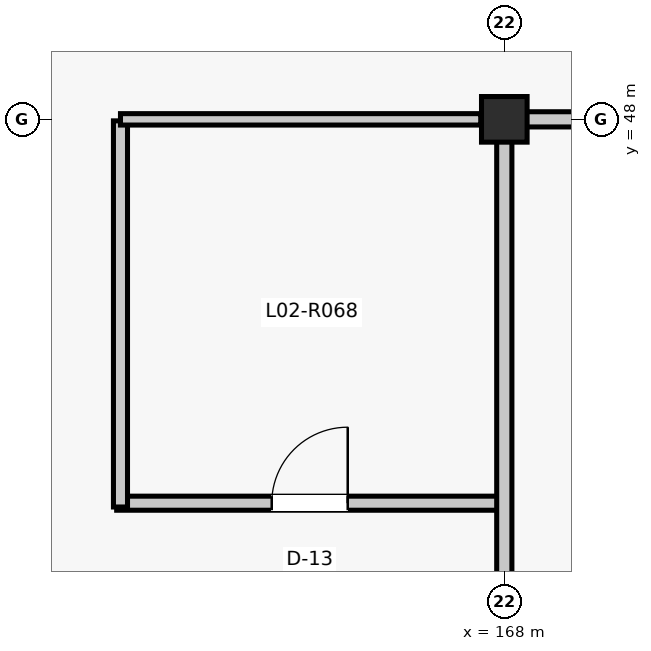
"""IFC4 building model, lengths in metres.
Left out: names, types, materials, properties, quantities, classifications, styles, units other than length and angle.
Written with IfcOpenShell. Run it as: python <this file> out.ifc"""

import sys

from ifc_helpers import new_model, si_unit, direction, frame, frame_2d, origin, origin_2d, place, context, subcontext, project, spatial, rectangle, extrude, element, fill, save


model = new_model("IFC4")
c1 = context("Model", 3, precision=1e-05, world=origin(), true_north=direction((0.0, 1.0)))
c2 = subcontext(c1, "Body", "Model", "MODEL_VIEW")
j1 = project(units=[si_unit("LENGTHUNIT", "METRE"), si_unit("PLANEANGLEUNIT", "RADIAN")], contexts=[c1])
p1 = place(None, origin())
s1 = spatial("IfcSite", under=j1, at=p1, CompositionType="ELEMENT")
p2 = place(p1, origin())
s2 = spatial("IfcBuilding", under=s1, at=p2, CompositionType="ELEMENT")
p3 = place(p2, frame((0.0, 0.0, 9.9)))
s3 = spatial("IfcBuildingStorey", under=s2, at=p3, CompositionType="ELEMENT", Elevation=9.9)
p4 = place(p3, frame((168.0, 48.0, 0.0), z_axis=(0.0, 0.0, 1.0), x_axis=(1.0, 0.0, 0.0)))
e1 = element("IfcColumn", 1, at=p4, inside=s3, PredefinedType="COLUMN", context=c2, shape_type="SweptSolid", body=[
    extrude(rectangle(XDim=0.6, YDim=0.6, at=origin_2d()), origin(), (0.0, 0.0, 1.0), 3.96),
])
p5 = place(p3, frame((162.9, 42.95, 0.0), z_axis=(0.0, 0.0, 1.0), x_axis=(1.0, 0.0, 0.0)))
e2 = element("IfcWall", 2, at=p5, inside=s3, PredefinedType="PARTITIONING", context=c2, shape_type="SweptSolid", body=[
    extrude(rectangle(XDim=5.08, YDim=0.185, at=frame_2d((2.54, 0.0))), origin(), (0.0, 0.0, 1.0), 3.151),
])
p6 = place(p5, frame((2.04, 0.0, 0.0)))
e3 = element("IfcOpeningElement", 3, at=p6, cuts=e2, PredefinedType="OPENING", context=c2, shape_type="SweptSolid", body=[
    extrude(rectangle(XDim=1.0, YDim=2.15, at=frame_2d((0.5, 1.075))), frame((0.0, 0.103, 0.0), z_axis=(0.0, -1.0, 0.0), x_axis=(1.0, 0.0, 0.0)), (0.0, 0.0, 1.0), 0.205),
])
p7 = place(p3, frame((162.95, 42.9, 0.0), z_axis=(0.0, 0.0, 1.0), x_axis=(0.0, 1.0, 0.0)))
e4 = element("IfcWall", 4, at=p7, inside=s3, PredefinedType="PARTITIONING", context=c2, shape_type="SweptSolid", body=[
    extrude(rectangle(XDim=5.08, YDim=0.185, at=frame_2d((2.54, 0.0))), origin(), (0.0, 0.0, 1.0), 3.141),
])
p8 = place(p3, frame((162.95, 48.0, 0.0), z_axis=(0.0, 0.0, 1.0), x_axis=(1.0, 0.0, 0.0)))
e5 = element("IfcWall", 5, at=p8, inside=s3, PredefinedType="PARTITIONING", context=c2, shape_type="SweptSolid", body=[
    extrude(rectangle(XDim=4.74, YDim=0.15, at=frame_2d((2.37, 0.0))), origin(), (0.0, 0.0, 1.0), 3.141),
])
p9 = place(p3, frame((168.0, 40.29, 0.0), z_axis=(0.0, 0.0, 1.0), x_axis=(0.0, 1.0, 0.0)))
e6 = element("IfcWall", 6, at=p9, inside=s3, PredefinedType="PARTITIONING", context=c2, shape_type="SweptSolid", body=[
    extrude(rectangle(XDim=7.42, YDim=0.2, at=frame_2d((3.71, 0.0))), origin(), (0.0, 0.0, 1.0), 3.151),
])
p10 = place(p9, frame((0.52, 0.0, 0.0)))
e7 = element("IfcOpeningElement", 7, at=p10, cuts=e6, PredefinedType="OPENING", context=c2, shape_type="SweptSolid", body=[
    extrude(rectangle(XDim=0.94, YDim=2.12, at=frame_2d((0.47, 1.06))), frame((0.0, 0.11, 0.0), z_axis=(0.0, -1.0, 0.0), x_axis=(1.0, 0.0, 0.0)), (0.0, 0.0, 1.0), 0.22),
])
p11 = place(p3, frame((168.29, 48.0, 0.0), z_axis=(0.0, 0.0, 1.0), x_axis=(1.0, 0.0, 0.0)))
e8 = element("IfcWall", 8, at=p11, inside=s3, PredefinedType="PARTITIONING", context=c2, shape_type="SweptSolid", body=[
    extrude(rectangle(XDim=7.42, YDim=0.2, at=frame_2d((3.71, 0.0))), origin(), (0.0, 0.0, 1.0), 3.151),
])
p12 = place(p11, frame((2.71, 0.0, 0.0)))
e9 = element("IfcOpeningElement", 9, at=p12, cuts=e8, PredefinedType="OPENING", context=c2, shape_type="SweptSolid", body=[
    extrude(rectangle(XDim=2.0, YDim=2.4, at=frame_2d((1.0, 1.2))), frame((0.0, 0.11, 0.0), z_axis=(0.0, -1.0, 0.0), x_axis=(1.0, 0.0, 0.0)), (0.0, 0.0, 1.0), 0.22),
])
p13 = place(p6, origin())
e10 = element("IfcDoor", 10, at=p13, inside=s3, OperationType="SINGLE_SWING_RIGHT", PredefinedType="DOOR", context=c2, shape_type="SweptSolid", body=[
    extrude(rectangle(XDim=1.0, YDim=2.15, at=frame_2d((0.5, 1.075))), frame((0.0, 0.025, 0.0), z_axis=(0.0, -1.0, 0.0), x_axis=(1.0, 0.0, 0.0)), (0.0, 0.0, 1.0), 0.05),
])
fill(e3, e10)
save(model, sys.argv[1])
